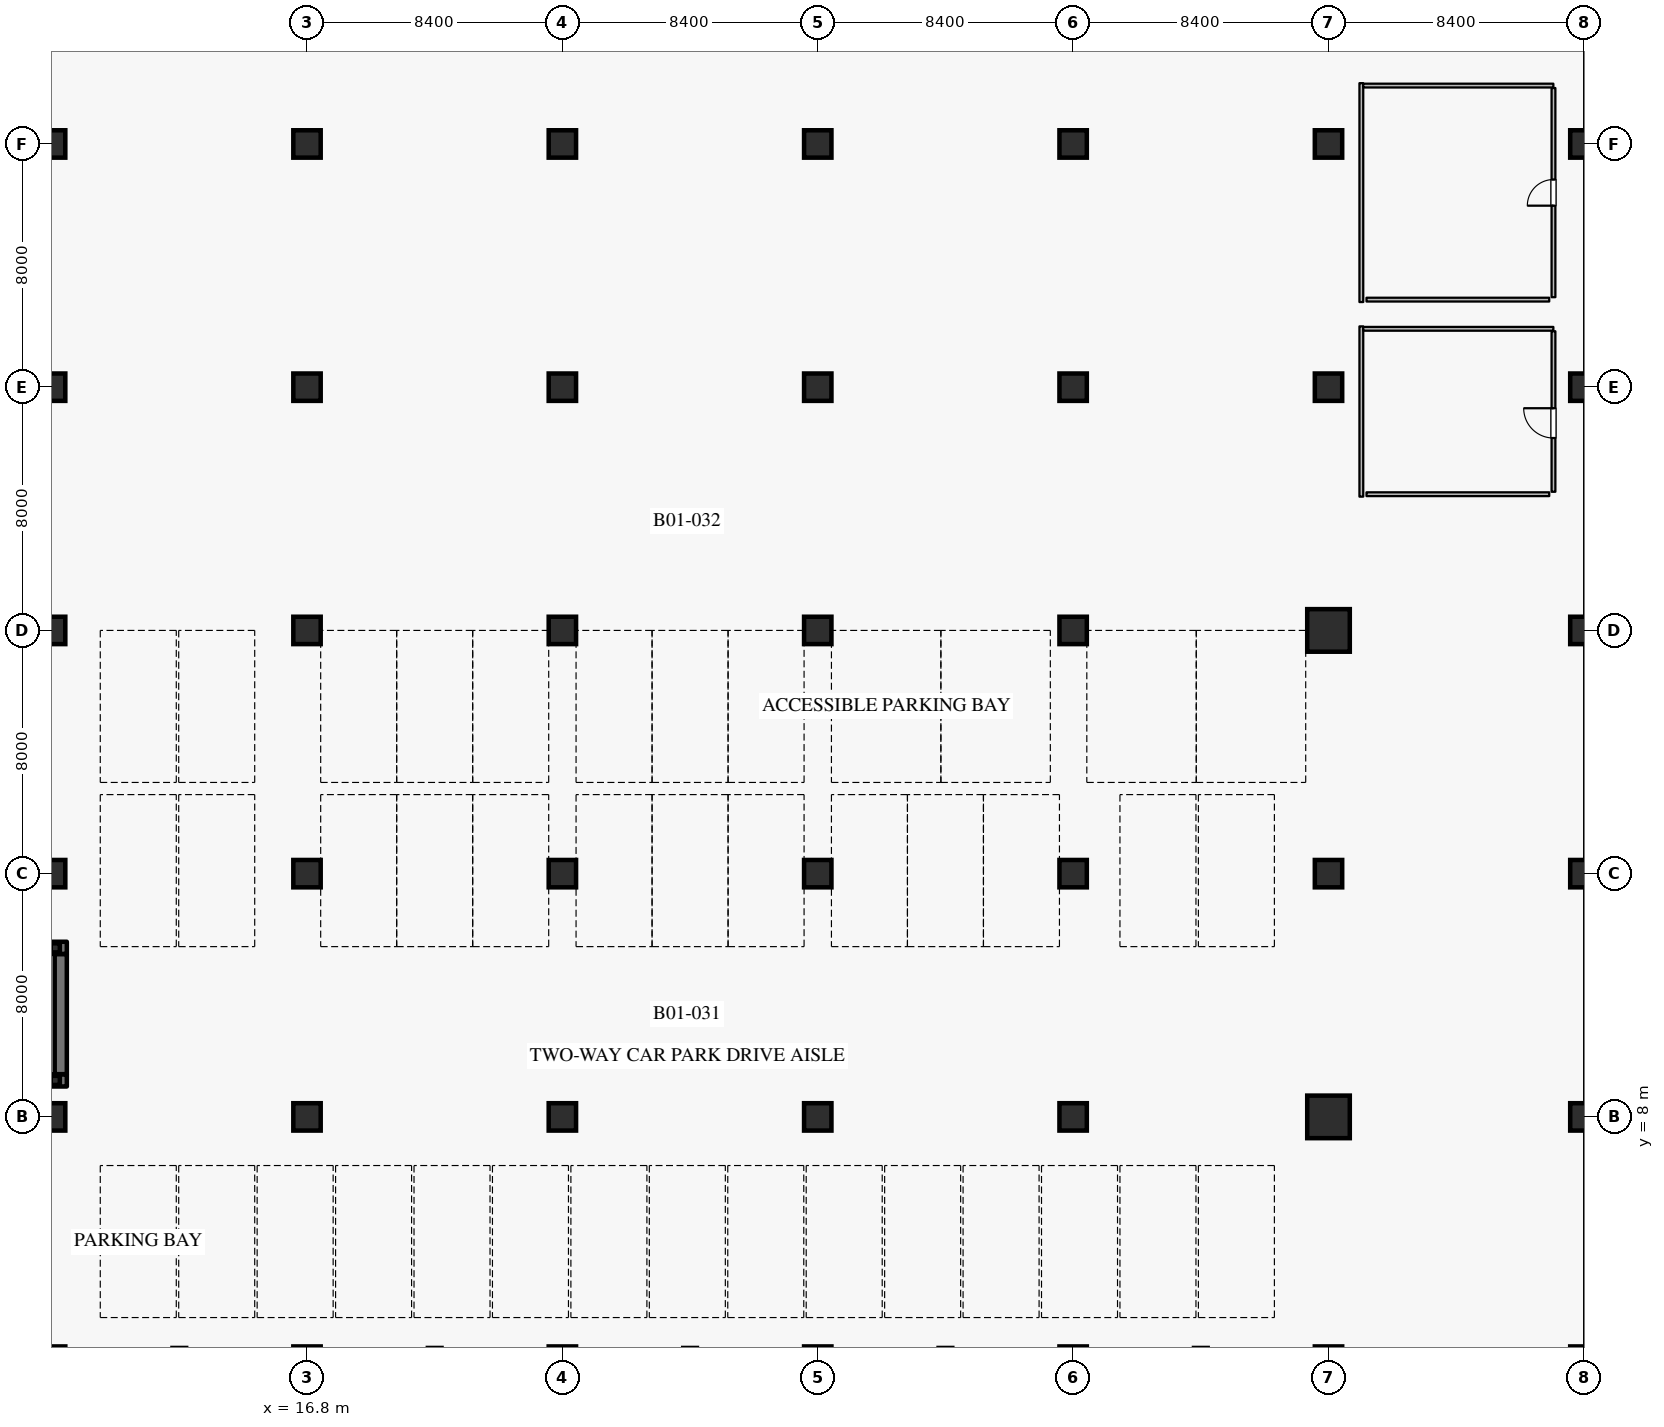
"""IFC4 building model, lengths in metres.
Left out: names, types, materials, properties, quantities, classifications, styles, units other than length and angle.
Written with IfcOpenShell. Run it as: python <this file> out.ifc"""

import sys

from ifc_helpers import new_model, si_unit, direction, frame, frame_2d, origin, origin_2d, place, context, subcontext, project, spatial, rectangle, hollow_rectangle, circle, extrude, element, fill, save


model = new_model("IFC4")
c1 = context("Model", 3, precision=1e-05, world=origin(), true_north=direction((0.0, 1.0)))
c2 = subcontext(c1, "Body", "Model", "MODEL_VIEW")
j1 = project(units=[si_unit("LENGTHUNIT", "METRE"), si_unit("PLANEANGLEUNIT", "RADIAN")], contexts=[c1])
p1 = place(None, origin())
s1 = spatial("IfcSite", under=j1, at=p1, CompositionType="ELEMENT")
p2 = place(p1, origin())
s2 = spatial("IfcBuilding", under=s1, at=p2, CompositionType="ELEMENT")
p3 = place(p2, frame((0.0, 0.0, -5.4)))
s3 = spatial("IfcBuildingStorey", under=s2, at=p3, CompositionType="ELEMENT", Elevation=-5.4)
for number, where, z_axis, x_axis in (
    (1, (8.4, 0.0, 0.0), (0.0, 0.0, 1.0), (1.0, 0.0, 0.0)),
    (2, (8.4, 8.0, 0.0), (0.0, 0.0, 1.0), (1.0, 0.0, 0.0)),
    (3, (8.4, 16.0, 0.0), (0.0, 0.0, 1.0), (1.0, 0.0, 0.0)),
    (4, (8.4, 24.0, 0.0), (0.0, 0.0, 1.0), (1.0, 0.0, 0.0)),
    (5, (8.4, 32.0, 0.0), (0.0, 0.0, 1.0), (1.0, 0.0, 0.0)),
    (6, (8.4, 40.0, 0.0), (0.0, 0.0, 1.0), (1.0, 0.0, 0.0)),
):
    element("IfcColumn", number, at=place(p3, frame(where, z_axis=z_axis, x_axis=x_axis)), inside=s3, PredefinedType="COLUMN", context=c2, shape_type="SweptSolid", body=[
        extrude(rectangle(XDim=0.9, YDim=0.9, at=origin_2d()), origin(), (0.0, 0.0, 1.0), 5.4),
    ])
p4 = place(p3, frame((12.6, 0.0, 0.0), z_axis=(0.0, 0.0, 1.0), x_axis=(1.0, 0.0, 0.0)))
e7 = element("IfcColumn", 7, at=p4, inside=s3, PredefinedType="PILASTER", context=c2, shape_type="SweptSolid", body=[
    extrude(rectangle(XDim=0.45, YDim=0.8, at=origin_2d()), origin(), (0.0, 0.0, 1.0), 5.4),
])
for number, where, z_axis, x_axis in (
    (8, (16.8, 0.0, 0.0), (0.0, 0.0, 1.0), (1.0, 0.0, 0.0)),
    (9, (16.8, 8.0, 0.0), (0.0, 0.0, 1.0), (1.0, 0.0, 0.0)),
    (10, (16.8, 16.0, 0.0), (0.0, 0.0, 1.0), (1.0, 0.0, 0.0)),
    (11, (16.8, 24.0, 0.0), (0.0, 0.0, 1.0), (1.0, 0.0, 0.0)),
    (12, (16.8, 32.0, 0.0), (0.0, 0.0, 1.0), (1.0, 0.0, 0.0)),
    (13, (16.8, 40.0, 0.0), (0.0, 0.0, 1.0), (1.0, 0.0, 0.0)),
):
    element("IfcColumn", number, at=place(p3, frame(where, z_axis=z_axis, x_axis=x_axis)), inside=s3, PredefinedType="COLUMN", context=c2, shape_type="SweptSolid", body=[
        extrude(rectangle(XDim=0.9, YDim=0.9, at=origin_2d()), origin(), (0.0, 0.0, 1.0), 5.4),
    ])
p5 = place(p3, frame((21.0, 0.0, 0.0), z_axis=(0.0, 0.0, 1.0), x_axis=(1.0, 0.0, 0.0)))
e14 = element("IfcColumn", 14, at=p5, inside=s3, PredefinedType="PILASTER", context=c2, shape_type="SweptSolid", body=[
    extrude(rectangle(XDim=0.45, YDim=0.8, at=origin_2d()), origin(), (0.0, 0.0, 1.0), 5.4),
])
for number, where, z_axis, x_axis in (
    (15, (25.2, 0.0, 0.0), (0.0, 0.0, 1.0), (1.0, 0.0, 0.0)),
    (16, (25.2, 8.0, 0.0), (0.0, 0.0, 1.0), (1.0, 0.0, 0.0)),
    (17, (25.2, 16.0, 0.0), (0.0, 0.0, 1.0), (1.0, 0.0, 0.0)),
    (18, (25.2, 24.0, 0.0), (0.0, 0.0, 1.0), (1.0, 0.0, 0.0)),
    (19, (25.2, 32.0, 0.0), (0.0, 0.0, 1.0), (1.0, 0.0, 0.0)),
    (20, (25.2, 40.0, 0.0), (0.0, 0.0, 1.0), (1.0, 0.0, 0.0)),
):
    element("IfcColumn", number, at=place(p3, frame(where, z_axis=z_axis, x_axis=x_axis)), inside=s3, PredefinedType="COLUMN", context=c2, shape_type="SweptSolid", body=[
        extrude(rectangle(XDim=0.9, YDim=0.9, at=origin_2d()), origin(), (0.0, 0.0, 1.0), 5.4),
    ])
p6 = place(p3, frame((29.4, 0.0, 0.0), z_axis=(0.0, 0.0, 1.0), x_axis=(1.0, 0.0, 0.0)))
e21 = element("IfcColumn", 21, at=p6, inside=s3, PredefinedType="PILASTER", context=c2, shape_type="SweptSolid", body=[
    extrude(rectangle(XDim=0.45, YDim=0.8, at=origin_2d()), origin(), (0.0, 0.0, 1.0), 5.4),
])
for number, where, z_axis, x_axis in (
    (22, (33.6, 0.0, 0.0), (0.0, 0.0, 1.0), (1.0, 0.0, 0.0)),
    (23, (33.6, 8.0, 0.0), (0.0, 0.0, 1.0), (1.0, 0.0, 0.0)),
    (24, (33.6, 16.0, 0.0), (0.0, 0.0, 1.0), (1.0, 0.0, 0.0)),
    (25, (33.6, 24.0, 0.0), (0.0, 0.0, 1.0), (1.0, 0.0, 0.0)),
    (26, (33.6, 32.0, 0.0), (0.0, 0.0, 1.0), (1.0, 0.0, 0.0)),
    (27, (33.6, 40.0, 0.0), (0.0, 0.0, 1.0), (1.0, 0.0, 0.0)),
):
    element("IfcColumn", number, at=place(p3, frame(where, z_axis=z_axis, x_axis=x_axis)), inside=s3, PredefinedType="COLUMN", context=c2, shape_type="SweptSolid", body=[
        extrude(rectangle(XDim=0.9, YDim=0.9, at=origin_2d()), origin(), (0.0, 0.0, 1.0), 5.4),
    ])
p7 = place(p3, frame((37.8, 0.0, 0.0), z_axis=(0.0, 0.0, 1.0), x_axis=(1.0, 0.0, 0.0)))
e28 = element("IfcColumn", 28, at=p7, inside=s3, PredefinedType="PILASTER", context=c2, shape_type="SweptSolid", body=[
    extrude(rectangle(XDim=0.45, YDim=0.8, at=origin_2d()), origin(), (0.0, 0.0, 1.0), 5.4),
])
for number, where, z_axis, x_axis in (
    (29, (42.0, 0.0, 0.0), (0.0, 0.0, 1.0), (1.0, 0.0, 0.0)),
    (30, (42.0, 8.0, 0.0), (0.0, 0.0, 1.0), (1.0, 0.0, 0.0)),
    (31, (42.0, 16.0, 0.0), (0.0, 0.0, 1.0), (1.0, 0.0, 0.0)),
    (32, (42.0, 24.0, 0.0), (0.0, 0.0, 1.0), (1.0, 0.0, 0.0)),
    (33, (42.0, 32.0, 0.0), (0.0, 0.0, 1.0), (1.0, 0.0, 0.0)),
    (34, (42.0, 40.0, 0.0), (0.0, 0.0, 1.0), (1.0, 0.0, 0.0)),
):
    element("IfcColumn", number, at=place(p3, frame(where, z_axis=z_axis, x_axis=x_axis)), inside=s3, PredefinedType="COLUMN", context=c2, shape_type="SweptSolid", body=[
        extrude(rectangle(XDim=0.9, YDim=0.9, at=origin_2d()), origin(), (0.0, 0.0, 1.0), 5.4),
    ])
p8 = place(p3, frame((46.2, 0.0, 0.0), z_axis=(0.0, 0.0, 1.0), x_axis=(1.0, 0.0, 0.0)))
e35 = element("IfcColumn", 35, at=p8, inside=s3, PredefinedType="PILASTER", context=c2, shape_type="SweptSolid", body=[
    extrude(rectangle(XDim=0.45, YDim=0.8, at=origin_2d()), origin(), (0.0, 0.0, 1.0), 5.4),
])
p9 = place(p3, frame((50.4, 0.0, 0.0), z_axis=(0.0, 0.0, 1.0), x_axis=(1.0, 0.0, 0.0)))
e36 = element("IfcColumn", 36, at=p9, inside=s3, PredefinedType="COLUMN", context=c2, shape_type="SweptSolid", body=[
    extrude(rectangle(XDim=0.9, YDim=0.9, at=origin_2d()), origin(), (0.0, 0.0, 1.0), 5.4),
])
p10 = place(p3, frame((50.4, 8.0, 0.0), z_axis=(0.0, 0.0, 1.0), x_axis=(1.0, 0.0, 0.0)))
e37 = element("IfcColumn", 37, at=p10, inside=s3, PredefinedType="COLUMN", context=c2, shape_type="SweptSolid", body=[
    extrude(circle(Radius=0.7, at=origin_2d()), origin(), (0.0, 0.0, 1.0), 5.4),
])
p11 = place(p3, frame((50.4, 16.0, 0.0), z_axis=(0.0, 0.0, 1.0), x_axis=(1.0, 0.0, 0.0)))
e38 = element("IfcColumn", 38, at=p11, inside=s3, PredefinedType="COLUMN", context=c2, shape_type="SweptSolid", body=[
    extrude(rectangle(XDim=0.9, YDim=0.9, at=origin_2d()), origin(), (0.0, 0.0, 1.0), 5.4),
])
p12 = place(p3, frame((50.4, 24.0, 0.0), z_axis=(0.0, 0.0, 1.0), x_axis=(1.0, 0.0, 0.0)))
e39 = element("IfcColumn", 39, at=p12, inside=s3, PredefinedType="COLUMN", context=c2, shape_type="SweptSolid", body=[
    extrude(circle(Radius=0.7, at=origin_2d()), origin(), (0.0, 0.0, 1.0), 5.4),
])
for number, where, z_axis, x_axis in (
    (40, (50.4, 32.0, 0.0), (0.0, 0.0, 1.0), (1.0, 0.0, 0.0)),
    (41, (50.4, 40.0, 0.0), (0.0, 0.0, 1.0), (1.0, 0.0, 0.0)),
    (42, (58.8, 0.0, 0.0), (0.0, 0.0, 1.0), (1.0, 0.0, 0.0)),
    (43, (58.8, 8.0, 0.0), (0.0, 0.0, 1.0), (1.0, 0.0, 0.0)),
    (44, (58.8, 16.0, 0.0), (0.0, 0.0, 1.0), (1.0, 0.0, 0.0)),
    (45, (58.8, 24.0, 0.0), (0.0, 0.0, 1.0), (1.0, 0.0, 0.0)),
    (46, (58.8, 32.0, 0.0), (0.0, 0.0, 1.0), (1.0, 0.0, 0.0)),
    (47, (58.8, 40.0, 0.0), (0.0, 0.0, 1.0), (1.0, 0.0, 0.0)),
):
    element("IfcColumn", number, at=place(p3, frame(where, z_axis=z_axis, x_axis=x_axis)), inside=s3, PredefinedType="COLUMN", context=c2, shape_type="SweptSolid", body=[
        extrude(rectangle(XDim=0.9, YDim=0.9, at=origin_2d()), origin(), (0.0, 0.0, 1.0), 5.4),
    ])
p13 = place(p3, frame((0.225, 9.2, 0.0), z_axis=(0.0, 0.0, 1.0), x_axis=(1.0, 0.0, 0.0)))
e48 = element("IfcWall", 48, at=p13, inside=s3, PredefinedType="SHEAR", context=c2, shape_type="SweptSolid", body=[
    extrude(rectangle(XDim=8.675, YDim=0.4, at=frame_2d((4.337, 0.0))), origin(), (0.0, 0.0, 1.0), 4.995),
])
p14 = place(p3, frame((8.7, 9.405, 0.0), z_axis=(0.0, 0.0, 1.0), x_axis=(0.0, 1.0, 0.0)))
e49 = element("IfcWall", 49, at=p14, inside=s3, PredefinedType="SHEAR", context=c2, shape_type="SweptSolid", body=[
    extrude(rectangle(XDim=3.95, YDim=0.4, at=frame_2d((1.975, 0.0))), origin(), (0.0, 0.0, 1.0), 4.995),
])
p15 = place(p3, frame((0.225, 13.56, 0.0), z_axis=(0.0, 0.0, 1.0), x_axis=(1.0, 0.0, 0.0)))
e50 = element("IfcWall", 50, at=p15, inside=s3, PredefinedType="SHEAR", context=c2, shape_type="SweptSolid", body=[
    extrude(rectangle(XDim=8.675, YDim=0.4, at=frame_2d((4.337, 0.0))), origin(), (0.0, 0.0, 1.0), 4.995),
])
p16 = place(p15, frame((1.095, 0.0, 0.0)))
e51 = element("IfcOpeningElement", 51, at=p16, cuts=e50, PredefinedType="OPENING", context=c2, shape_type="SweptSolid", body=[
    extrude(rectangle(XDim=1.16, YDim=2.2, at=frame_2d((0.58, 1.1))), frame((0.0, 0.21, 0.0), z_axis=(0.0, -1.0, 0.0), x_axis=(1.0, 0.0, 0.0)), (0.0, 0.0, 1.0), 0.42),
])
for number, where, z_axis, x_axis in (
    (52, (8.52, 9.2, 0.0), (0.0, 0.0, 1.0), (1.0, 0.0, 0.0)),
    (53, (8.52, 13.56, 0.0), (0.0, 0.0, 1.0), (1.0, 0.0, 0.0)),
):
    element("IfcColumn", number, at=place(p3, frame(where, z_axis=z_axis, x_axis=x_axis)), inside=s3, PredefinedType="COLUMN", context=c2, shape_type="SweptSolid", body=[
        extrude(hollow_rectangle(XDim=0.3, YDim=0.3, WallThickness=0.012, at=origin_2d()), origin(), (0.0, 0.0, 1.0), 2.52),
    ])
p17 = place(p3, frame((57.8, 28.56, 0.0), z_axis=(0.0, 0.0, 1.0), x_axis=(0.0, 1.0, 0.0)))
e54 = element("IfcWall", 54, at=p17, inside=s3, PredefinedType="PARTITIONING", context=c2, shape_type="SweptSolid", body=[
    extrude(rectangle(XDim=5.28, YDim=0.125, at=frame_2d((2.64, 0.0))), origin(), (0.0, 0.0, 1.0), 4.995),
])
p18 = place(p17, frame((1.768, 0.0, 0.0)))
e55 = element("IfcOpeningElement", 55, at=p18, cuts=e54, PredefinedType="OPENING", context=c2, shape_type="SweptSolid", body=[
    extrude(rectangle(XDim=0.98, YDim=2.15, at=frame_2d((0.49, 1.075))), frame((0.0, 0.073, 0.0), z_axis=(0.0, -1.0, 0.0), x_axis=(1.0, 0.0, 0.0)), (0.0, 0.0, 1.0), 0.145),
])
p19 = place(p3, frame((51.65, 28.48, 0.0), z_axis=(0.0, 0.0, 1.0), x_axis=(1.0, 0.0, 0.0)))
e56 = element("IfcWall", 56, at=p19, inside=s3, PredefinedType="PARTITIONING", context=c2, shape_type="SweptSolid", body=[
    extrude(rectangle(XDim=6.01, YDim=0.125, at=frame_2d((3.005, 0.0))), origin(), (0.0, 0.0, 1.0), 4.995),
])
p20 = place(p3, frame((57.8, 34.96, 0.0), z_axis=(0.0, 0.0, 1.0), x_axis=(0.0, 1.0, 0.0)))
e57 = element("IfcWall", 57, at=p20, inside=s3, PredefinedType="PARTITIONING", context=c2, shape_type="SweptSolid", body=[
    extrude(rectangle(XDim=6.88, YDim=0.125, at=frame_2d((3.44, 0.0))), origin(), (0.0, 0.0, 1.0), 4.995),
])
p21 = place(p20, frame((3.01, 0.0, 0.0)))
e58 = element("IfcOpeningElement", 58, at=p21, cuts=e57, PredefinedType="OPENING", context=c2, shape_type="SweptSolid", body=[
    extrude(rectangle(XDim=0.86, YDim=2.12, at=frame_2d((0.43, 1.06))), frame((0.0, 0.073, 0.0), z_axis=(0.0, -1.0, 0.0), x_axis=(1.0, 0.0, 0.0)), (0.0, 0.0, 1.0), 0.145),
])
p22 = place(p3, frame((51.65, 34.88, 0.0), z_axis=(0.0, 0.0, 1.0), x_axis=(1.0, 0.0, 0.0)))
e59 = element("IfcWall", 59, at=p22, inside=s3, PredefinedType="PARTITIONING", context=c2, shape_type="SweptSolid", body=[
    extrude(rectangle(XDim=6.01, YDim=0.125, at=frame_2d((3.005, 0.0))), origin(), (0.0, 0.0, 1.0), 4.995),
])
p23 = place(p3, frame((51.48, 28.4, 0.0), z_axis=(0.0, 0.0, 1.0), x_axis=(0.0, 1.0, 0.0)))
e60 = element("IfcWall", 60, at=p23, inside=s3, PredefinedType="PARTITIONING", context=c2, shape_type="SweptSolid", body=[
    extrude(rectangle(XDim=5.6, YDim=0.125, at=frame_2d((2.8, 0.0))), origin(), (0.0, 0.0, 1.0), 4.995),
])
p24 = place(p3, frame((51.542, 33.92, 0.0), z_axis=(0.0, 0.0, 1.0), x_axis=(1.0, 0.0, 0.0)))
e61 = element("IfcWall", 61, at=p24, inside=s3, PredefinedType="PARTITIONING", context=c2, shape_type="SweptSolid", body=[
    extrude(rectangle(XDim=6.254, YDim=0.125, at=frame_2d((3.127, 0.0))), origin(), (0.0, 0.0, 1.0), 4.995),
])
p25 = place(p3, frame((51.48, 34.8, 0.0), z_axis=(0.0, 0.0, 1.0), x_axis=(0.0, 1.0, 0.0)))
e62 = element("IfcWall", 62, at=p25, inside=s3, PredefinedType="PARTITIONING", context=c2, shape_type="SweptSolid", body=[
    extrude(rectangle(XDim=7.2, YDim=0.125, at=frame_2d((3.6, 0.0))), origin(), (0.0, 0.0, 1.0), 4.995),
])
p26 = place(p3, frame((51.542, 41.92, 0.0), z_axis=(0.0, 0.0, 1.0), x_axis=(1.0, 0.0, 0.0)))
e63 = element("IfcWall", 63, at=p26, inside=s3, PredefinedType="PARTITIONING", context=c2, shape_type="SweptSolid", body=[
    extrude(rectangle(XDim=6.254, YDim=0.125, at=frame_2d((3.127, 0.0))), origin(), (0.0, 0.0, 1.0), 4.995),
])
p27 = place(p18, origin())
e64 = element("IfcDoor", 64, at=p27, inside=s3, OperationType="SINGLE_SWING_RIGHT", PredefinedType="DOOR", context=c2, shape_type="SweptSolid", body=[
    extrude(rectangle(XDim=0.98, YDim=2.15, at=frame_2d((0.49, 1.075))), frame((0.0, 0.025, 0.0), z_axis=(0.0, -1.0, 0.0), x_axis=(1.0, 0.0, 0.0)), (0.0, 0.0, 1.0), 0.05),
])
fill(e55, e64)
p28 = place(p21, origin())
e65 = element("IfcDoor", 65, at=p28, inside=s3, OperationType="SINGLE_SWING_LEFT", PredefinedType="DOOR", context=c2, shape_type="SweptSolid", body=[
    extrude(rectangle(XDim=0.86, YDim=2.12, at=frame_2d((0.43, 1.06))), frame((0.0, 0.025, 0.0), z_axis=(0.0, -1.0, 0.0), x_axis=(1.0, 0.0, 0.0)), (0.0, 0.0, 1.0), 0.05),
])
fill(e58, e65)
save(model, sys.argv[1])
